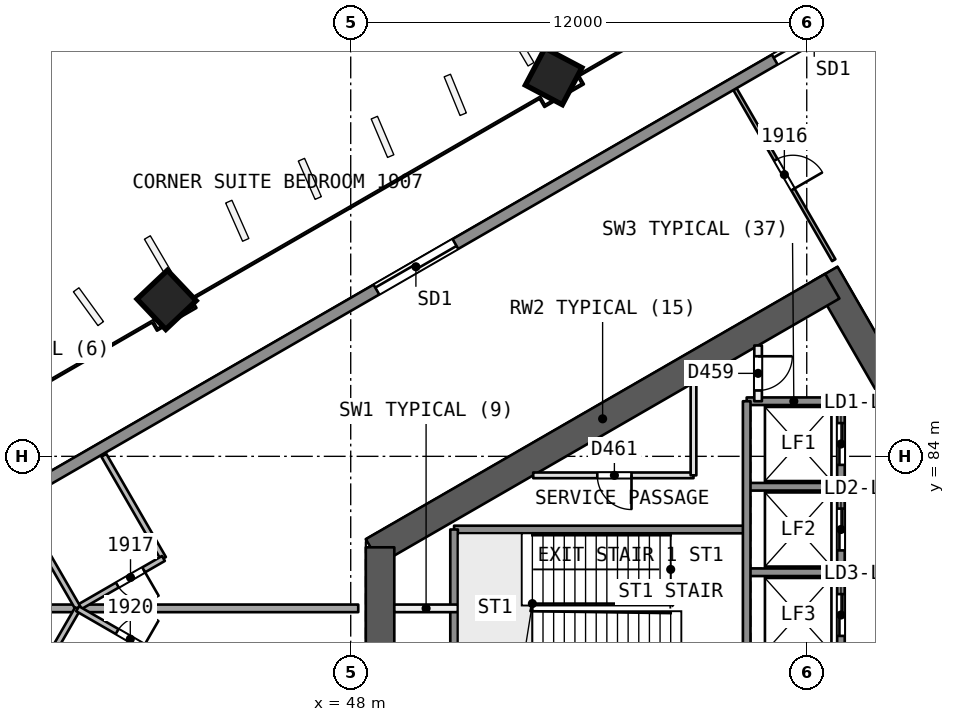
"""IFC4 building model, lengths in metres.
Left out: names, types, materials, properties, quantities, classifications, styles, units other than length and angle.
Written with IfcOpenShell. Run it as: python <this file> out.ifc"""

import sys

from ifc_helpers import new_model, si_unit, direction, frame, frame_2d, origin, origin_2d, place, context, subcontext, project, spatial, rectangle, extrude, element, fill, save


model = new_model("IFC4")
c1 = context("Model", 3, precision=1e-05, world=origin(), true_north=direction((0.0, 1.0)))
c2 = subcontext(c1, "Body", "Model", "MODEL_VIEW")
j1 = project(units=[si_unit("LENGTHUNIT", "METRE"), si_unit("PLANEANGLEUNIT", "RADIAN")], contexts=[c1])
p1 = place(None, origin())
s1 = spatial("IfcSite", under=j1, at=p1, CompositionType="ELEMENT")
p2 = place(p1, origin())
s2 = spatial("IfcBuilding", under=s1, at=p2, CompositionType="ELEMENT")
p3 = place(p2, frame((0.0, 0.0, 83.2)))
s3 = spatial("IfcBuildingStorey", under=s2, at=p3, CompositionType="ELEMENT", Elevation=83.2)
p4 = place(p3, frame((65.567, 80.0, 0.0), z_axis=(0.0, 0.0, 1.0), x_axis=(-0.499988615364, 0.866031976607, 0.0)))
e1 = element("IfcWall", 1, at=p4, inside=s3, PredefinedType="SHEAR", context=c2, shape_type="SweptSolid", body=[
    extrude(rectangle(XDim=10.163, YDim=0.75, at=frame_2d((5.082, 0.0))), origin(), (0.0, 0.0, 1.0), 3.7),
])
p5 = place(p4, frame((0.733, 0.0, 0.0)))
e2 = element("IfcOpeningElement", 2, at=p5, cuts=e1, PredefinedType="OPENING", context=c2, shape_type="SweptSolid", body=[
    extrude(rectangle(XDim=1.2, YDim=2.1, at=frame_2d((0.6, 1.05))), frame((0.0, 0.385, 0.0), z_axis=(0.0, -1.0, 0.0), x_axis=(1.0, 0.0, 0.0)), (0.0, 0.0, 1.0), 0.771),
])
p6 = place(p3, frame((60.673, 88.477, 0.0), z_axis=(0.0, 0.0, 1.0), x_axis=(-0.8660248072, -0.500001033313, 0.0)))
e3 = element("IfcWall", 3, at=p6, inside=s3, PredefinedType="SHEAR", context=c2, shape_type="SweptSolid", body=[
    extrude(rectangle(XDim=13.958, YDim=0.75, at=frame_2d((6.979, 0.0))), origin(), (0.0, 0.0, 1.0), 3.7),
])
p7 = place(p3, frame((48.772, 81.606, 0.0), z_axis=(0.0, 0.0, 1.0), x_axis=(0.0, -1.0, 0.0)))
e4 = element("IfcWall", 4, at=p7, inside=s3, PredefinedType="SHEAR", context=c2, shape_type="SweptSolid", body=[
    extrude(rectangle(XDim=3.429, YDim=0.75, at=frame_2d((1.714, 0.0))), origin(), (0.0, 0.0, 1.0), 3.7),
])
p8 = place(p3, frame((60.673, 71.523, 0.0), z_axis=(0.0, 0.0, 1.0), x_axis=(0.499997052475, 0.866027105532, 0.0)))
e5 = element("IfcWall", 5, at=p8, inside=s3, PredefinedType="SHEAR", context=c2, shape_type="SweptSolid", body=[
    extrude(rectangle(XDim=10.005, YDim=0.75, at=frame_2d((5.002, 0.0))), origin(), (0.0, 0.0, 1.0), 3.7),
])
p9 = place(p8, frame((7.855, 0.0, 0.0)))
e6 = element("IfcOpeningElement", 6, at=p9, cuts=e5, PredefinedType="OPENING", context=c2, shape_type="SweptSolid", body=[
    extrude(rectangle(XDim=1.2, YDim=2.1, at=frame_2d((0.6, 1.05))), frame((0.0, 0.385, 0.0), z_axis=(0.0, -1.0, 0.0), x_axis=(1.0, 0.0, 0.0)), (0.0, 0.0, 1.0), 0.771),
])
p10 = place(p3, frame((53.317, 94.011, 0.0), z_axis=(0.019328516974, -0.012138044789, 0.999739504221), x_axis=(-0.500200160538, 0.865674608258, 0.020180981521)))
e7 = element("IfcColumn", 7, at=p10, inside=s3, PredefinedType="COLUMN", context=c2, shape_type="SweptSolid", body=[
    extrude(rectangle(XDim=1.1, YDim=1.1, at=origin_2d()), origin(), (0.0, 0.0, 1.0), 3.701),
])
p11 = place(p3, frame((43.121, 88.125, 0.0), z_axis=(0.02855911485, -0.006793507689, 0.999569019734), x_axis=(-0.500405785832, 0.865555785013, 0.020180003373)))
e8 = element("IfcColumn", 8, at=p11, inside=s3, PredefinedType="COLUMN", context=c2, shape_type="SweptSolid", body=[
    extrude(rectangle(XDim=1.1, YDim=1.1, at=origin_2d()), origin(), (0.0, 0.0, 1.0), 3.702),
])
p12 = place(p3, frame((58.112, 93.663, 0.0), z_axis=(0.0, 0.0, 1.0), x_axis=(0.499973171224, -0.866040892832, 0.0)))
e9 = element("IfcWall", 9, at=p12, inside=s3, PredefinedType="PARTITIONING", context=c2, shape_type="SweptSolid", body=[
    extrude(rectangle(XDim=5.198, YDim=0.1, at=frame_2d((2.599, 0.0))), origin(), (0.0, 0.0, 1.0), 3.2),
])
p13 = place(p12, frame((2.149, 0.0, 0.0)))
e10 = element("IfcOpeningElement", 10, at=p13, cuts=e9, PredefinedType="OPENING", context=c2, shape_type="SweptSolid", body=[
    extrude(rectangle(XDim=0.9, YDim=2.1, at=frame_2d((0.45, 1.05))), frame((0.0, 0.061, 0.0), z_axis=(0.0, -1.0, 0.0), x_axis=(1.0, 0.0, 0.0)), (0.0, 0.0, 1.0), 0.121),
])
p14 = place(p3, frame((41.504, 84.028, 0.0), z_axis=(0.0, 0.0, 1.0), x_axis=(0.499967424082, -0.866044210682, 0.0)))
e11 = element("IfcWall", 11, at=p14, inside=s3, PredefinedType="PARTITIONING", context=c2, shape_type="SweptSolid", body=[
    extrude(rectangle(XDim=3.135, YDim=0.15, at=frame_2d((1.567, 0.0))), origin(), (0.0, 0.0, 1.0), 3.2),
])
p15 = place(p3, frame((43.072, 81.313, 0.0), z_axis=(0.0, 0.0, 1.0), x_axis=(-0.866021400173, -0.500006934395, 0.0)))
e12 = element("IfcWall", 12, at=p15, inside=s3, PredefinedType="PARTITIONING", context=c2, shape_type="SweptSolid", body=[
    extrude(rectangle(XDim=2.6, YDim=0.15, at=frame_2d((1.3, 0.0))), origin(), (0.0, 0.0, 1.0), 3.2),
])
p16 = place(p15, frame((0.6, 0.0, 0.0)))
e13 = element("IfcOpeningElement", 13, at=p16, cuts=e12, PredefinedType="OPENING", context=c2, shape_type="SweptSolid", body=[
    extrude(rectangle(XDim=0.8, YDim=2.1, at=frame_2d((0.4, 1.05))), frame((0.0, 0.085, 0.0), z_axis=(0.0, -1.0, 0.0), x_axis=(1.0, 0.0, 0.0)), (0.0, 0.0, 1.0), 0.171),
])
p17 = place(p3, frame((40.82, 80.013, 0.0), z_axis=(0.0, 0.0, 1.0), x_axis=(-0.499995114243, 0.866028224559, 0.0)))
e14 = element("IfcWall", 14, at=p17, inside=s3, PredefinedType="PARTITIONING", context=c2, shape_type="SweptSolid", body=[
    extrude(rectangle(XDim=2.635, YDim=0.15, at=frame_2d((1.318, 0.0))), origin(), (0.0, 0.0, 1.0), 3.2),
])
p18 = place(p3, frame((39.502, 80.0, 0.0), z_axis=(0.0, 0.0, 1.0), x_axis=(1.0, 0.0, 0.0)))
e15 = element("IfcWall", 15, at=p18, inside=s3, PredefinedType="PARTITIONING", context=c2, shape_type="SweptSolid", body=[
    extrude(rectangle(XDim=8.696, YDim=0.2, at=frame_2d((4.348, 0.0))), origin(), (0.0, 0.0, 1.0), 3.2),
])
p19 = place(p3, frame((39.502, 77.718, 0.0), z_axis=(0.0, 0.0, 1.0), x_axis=(0.499972156837, 0.866041478445, 0.0)))
e16 = element("IfcWall", 16, at=p19, inside=s3, PredefinedType="PARTITIONING", context=c2, shape_type="SweptSolid", body=[
    extrude(rectangle(XDim=2.624, YDim=0.15, at=frame_2d((1.312, 0.0))), origin(), (0.0, 0.0, 1.0), 3.2),
])
p20 = place(p3, frame((40.814, 79.99, 0.0), z_axis=(0.0, 0.0, 1.0), x_axis=(0.866062058628, -0.499936506574, 0.0)))
e17 = element("IfcWall", 17, at=p20, inside=s3, PredefinedType="PARTITIONING", context=c2, shape_type="SweptSolid", body=[
    extrude(rectangle(XDim=2.6, YDim=0.15, at=frame_2d((1.3, 0.0))), origin(), (0.0, 0.0, 1.0), 3.2),
])
p21 = place(p20, frame((1.2, 0.0, 0.0)))
e18 = element("IfcOpeningElement", 18, at=p21, cuts=e17, PredefinedType="OPENING", context=c2, shape_type="SweptSolid", body=[
    extrude(rectangle(XDim=0.8, YDim=2.1, at=frame_2d((0.4, 1.05))), frame((0.0, 0.085, 0.0), z_axis=(0.0, -1.0, 0.0), x_axis=(1.0, 0.0, 0.0)), (0.0, 0.0, 1.0), 0.171),
])
p22 = place(p3, frame((39.353, 83.005, 0.0), z_axis=(0.0, 0.0, 1.0), x_axis=(0.866025832118, 0.499999258104, 0.0)))
e19 = element("IfcWall", 19, at=p22, inside=s3, PredefinedType="SOLIDWALL", context=c2, shape_type="SweptSolid", body=[
    extrude(rectangle(XDim=58.737, YDim=0.3, at=frame_2d((29.368, 0.0))), origin(), (0.0, 0.0, 1.0), 3.2),
])
p23 = place(p22, frame((28.636, 0.0, 0.0)))
e20 = element("IfcOpeningElement", 20, at=p23, cuts=e19, PredefinedType="OPENING", context=c2, shape_type="SweptSolid", body=[
    extrude(rectangle(XDim=2.4, YDim=2.4, at=frame_2d((1.2, 1.2))), frame((0.0, 0.161, 0.0), z_axis=(0.0, -1.0, 0.0), x_axis=(1.0, 0.0, 0.0)), (0.0, 0.0, 1.0), 0.321),
])
p24 = place(p22, frame((33.936, 0.0, 0.0)))
e21 = element("IfcOpeningElement", 21, at=p24, cuts=e19, PredefinedType="OPENING", context=c2, shape_type="SweptSolid", body=[
    extrude(rectangle(XDim=2.4, YDim=2.4, at=frame_2d((1.2, 1.2))), frame((0.0, 0.161, 0.0), z_axis=(0.0, -1.0, 0.0), x_axis=(1.0, 0.0, 0.0)), (0.0, 0.0, 1.0), 0.321),
])
p25 = place(p22, frame((45.575, 0.0, 0.0)))
e22 = element("IfcOpeningElement", 22, at=p25, cuts=e19, PredefinedType="OPENING", context=c2, shape_type="SweptSolid", body=[
    extrude(rectangle(XDim=2.4, YDim=2.4, at=frame_2d((1.2, 1.2))), frame((0.0, 0.161, 0.0), z_axis=(0.0, -1.0, 0.0), x_axis=(1.0, 0.0, 0.0)), (0.0, 0.0, 1.0), 0.321),
])
p26 = place(p22, frame((22.868, 0.0, 0.0)))
e23 = element("IfcOpeningElement", 23, at=p26, cuts=e19, PredefinedType="OPENING", context=c2, shape_type="SweptSolid", body=[
    extrude(rectangle(XDim=2.4, YDim=2.4, at=frame_2d((1.2, 1.2))), frame((0.0, 0.161, 0.0), z_axis=(0.0, -1.0, 0.0), x_axis=(1.0, 0.0, 0.0)), (0.0, 0.0, 1.0), 0.321),
])
p27 = place(p22, frame((10.765, 0.0, 0.0)))
e24 = element("IfcOpeningElement", 24, at=p27, cuts=e19, PredefinedType="OPENING", context=c2, shape_type="SweptSolid", body=[
    extrude(rectangle(XDim=2.4, YDim=2.4, at=frame_2d((1.2, 1.2))), frame((0.0, 0.161, 0.0), z_axis=(0.0, -1.0, 0.0), x_axis=(1.0, 0.0, 0.0)), (0.0, 0.0, 1.0), 0.321),
])
p28 = place(p3, frame((60.9, 85.45, 0.0), z_axis=(0.0, 0.0, 1.0), x_axis=(-1.0, 0.0, 0.0)))
e25 = element("IfcWall", 25, at=p28, inside=s3, PredefinedType="SOLIDWALL", context=c2, shape_type="SweptSolid", body=[
    extrude(rectangle(XDim=2.48, YDim=0.2, at=frame_2d((1.24, 0.0))), origin(), (0.0, 0.0, 1.0), 3.2),
])
p29 = place(p3, frame((57.02, 83.5, 0.0), z_axis=(0.0, 0.0, 1.0), x_axis=(-1.0, 0.0, 0.0)))
e26 = element("IfcWall", 26, at=p29, inside=s3, PredefinedType="PARTITIONING", context=c2, shape_type="SweptSolid", body=[
    extrude(rectangle(XDim=4.218, YDim=0.15, at=frame_2d((2.109, 0.0))), origin(), (0.0, 0.0, 1.0), 3.2),
])
p30 = place(p29, frame((1.631, 0.0, 0.0)))
e27 = element("IfcOpeningElement", 27, at=p30, cuts=e26, PredefinedType="OPENING", context=c2, shape_type="SweptSolid", body=[
    extrude(rectangle(XDim=0.9, YDim=2.1, at=frame_2d((0.45, 1.05))), frame((0.0, 0.085, 0.0), z_axis=(0.0, -1.0, 0.0), x_axis=(1.0, 0.0, 0.0)), (0.0, 0.0, 1.0), 0.171),
])
p31 = place(p3, frame((60.9, 83.2, 0.0), z_axis=(0.0, 0.0, 1.0), x_axis=(-1.0, 0.0, 0.0)))
e28 = element("IfcWall", 28, at=p31, inside=s3, PredefinedType="SOLIDWALL", context=c2, shape_type="SweptSolid", body=[
    extrude(rectangle(XDim=2.48, YDim=0.2, at=frame_2d((1.24, 0.0))), origin(), (0.0, 0.0, 1.0), 3.2),
])
p32 = place(p3, frame((58.42, 82.075, 0.0), z_axis=(0.0, 0.0, 1.0), x_axis=(-1.0, 0.0, 0.0)))
e29 = element("IfcWall", 29, at=p32, inside=s3, PredefinedType="SOLIDWALL", context=c2, shape_type="SweptSolid", body=[
    extrude(rectangle(XDim=7.7, YDim=0.2, at=frame_2d((3.85, 0.0))), origin(), (0.0, 0.0, 1.0), 3.2),
])
p33 = place(p3, frame((60.9, 80.95, 0.0), z_axis=(0.0, 0.0, 1.0), x_axis=(-1.0, 0.0, 0.0)))
e30 = element("IfcWall", 30, at=p33, inside=s3, PredefinedType="SOLIDWALL", context=c2, shape_type="SweptSolid", body=[
    extrude(rectangle(XDim=2.48, YDim=0.2, at=frame_2d((1.24, 0.0))), origin(), (0.0, 0.0, 1.0), 3.2),
])
p34 = place(p3, frame((50.82, 80.0, 0.0), z_axis=(0.0, 0.0, 1.0), x_axis=(-1.0, 0.0, 0.0)))
e31 = element("IfcWall", 31, at=p34, inside=s3, PredefinedType="PARTITIONING", context=c2, shape_type="SweptSolid", body=[
    extrude(rectangle(XDim=1.673, YDim=0.2, at=frame_2d((0.836, 0.0))), origin(), (0.0, 0.0, 1.0), 3.2),
])
p35 = place(p3, frame((60.9, 85.45, 0.0), z_axis=(0.0, 0.0, 1.0), x_axis=(0.0, -1.0, 0.0)))
e32 = element("IfcWall", 32, at=p35, inside=s3, PredefinedType="SOLIDWALL", context=c2, shape_type="SweptSolid", body=[
    extrude(rectangle(XDim=10.9, YDim=0.2, at=frame_2d((5.45, 0.0))), origin(), (0.0, 0.0, 1.0), 3.2),
])
p36 = place(p35, frame((0.575, 0.0, 0.0)))
e33 = element("IfcOpeningElement", 33, at=p36, cuts=e32, PredefinedType="OPENING", context=c2, shape_type="SweptSolid", body=[
    extrude(rectangle(XDim=1.1, YDim=2.1, at=frame_2d((0.55, 1.05))), frame((0.0, 0.11, 0.0), z_axis=(0.0, -1.0, 0.0), x_axis=(1.0, 0.0, 0.0)), (0.0, 0.0, 1.0), 0.221),
])
p37 = place(p35, frame((2.825, 0.0, 0.0)))
e34 = element("IfcOpeningElement", 34, at=p37, cuts=e32, PredefinedType="OPENING", context=c2, shape_type="SweptSolid", body=[
    extrude(rectangle(XDim=1.1, YDim=2.1, at=frame_2d((0.55, 1.05))), frame((0.0, 0.11, 0.0), z_axis=(0.0, -1.0, 0.0), x_axis=(1.0, 0.0, 0.0)), (0.0, 0.0, 1.0), 0.221),
])
p38 = place(p35, frame((5.075, 0.0, 0.0)))
e35 = element("IfcOpeningElement", 35, at=p38, cuts=e32, PredefinedType="OPENING", context=c2, shape_type="SweptSolid", body=[
    extrude(rectangle(XDim=1.1, YDim=2.1, at=frame_2d((0.55, 1.05))), frame((0.0, 0.11, 0.0), z_axis=(0.0, -1.0, 0.0), x_axis=(1.0, 0.0, 0.0)), (0.0, 0.0, 1.0), 0.221),
])
p39 = place(p35, frame((7.325, 0.0, 0.0)))
e36 = element("IfcOpeningElement", 36, at=p39, cuts=e32, PredefinedType="OPENING", context=c2, shape_type="SweptSolid", body=[
    extrude(rectangle(XDim=1.1, YDim=2.1, at=frame_2d((0.55, 1.05))), frame((0.0, 0.11, 0.0), z_axis=(0.0, -1.0, 0.0), x_axis=(1.0, 0.0, 0.0)), (0.0, 0.0, 1.0), 0.221),
])
p40 = place(p3, frame((58.72, 86.917, 0.0), z_axis=(0.0, 0.0, 1.0), x_axis=(0.0, -1.0, 0.0)))
e37 = element("IfcWall", 37, at=p40, inside=s3, PredefinedType="PARTITIONING", context=c2, shape_type="SweptSolid", body=[
    extrude(rectangle(XDim=1.467, YDim=0.2, at=frame_2d((0.733, 0.0))), origin(), (0.0, 0.0, 1.0), 3.2),
])
p41 = place(p40, frame((0.283, 0.0, 0.0)))
e38 = element("IfcOpeningElement", 38, at=p41, cuts=e37, PredefinedType="OPENING", context=c2, shape_type="SweptSolid", body=[
    extrude(rectangle(XDim=0.9, YDim=2.1, at=frame_2d((0.45, 1.05))), frame((0.0, 0.11, 0.0), z_axis=(0.0, -1.0, 0.0), x_axis=(1.0, 0.0, 0.0)), (0.0, 0.0, 1.0), 0.221),
])
p42 = place(p3, frame((58.42, 85.45, 0.0), z_axis=(0.0, 0.0, 1.0), x_axis=(0.0, -1.0, 0.0)))
e39 = element("IfcWall", 39, at=p42, inside=s3, PredefinedType="SOLIDWALL", context=c2, shape_type="SweptSolid", body=[
    extrude(rectangle(XDim=9.0, YDim=0.2, at=frame_2d((4.5, 0.0))), origin(), (0.0, 0.0, 1.0), 3.2),
])
p43 = place(p3, frame((57.02, 85.935, 0.0), z_axis=(0.0, 0.0, 1.0), x_axis=(0.0, -1.0, 0.0)))
e40 = element("IfcWall", 40, at=p43, inside=s3, PredefinedType="PARTITIONING", context=c2, shape_type="SweptSolid", body=[
    extrude(rectangle(XDim=2.435, YDim=0.15, at=frame_2d((1.218, 0.0))), origin(), (0.0, 0.0, 1.0), 3.2),
])
p44 = place(p3, frame((50.72, 82.075, 0.0), z_axis=(0.0, 0.0, 1.0), x_axis=(0.0, -1.0, 0.0)))
e41 = element("IfcWall", 41, at=p44, inside=s3, PredefinedType="SOLIDWALL", context=c2, shape_type="SweptSolid", body=[
    extrude(rectangle(XDim=4.15, YDim=0.2, at=frame_2d((2.075, 0.0))), origin(), (0.0, 0.0, 1.0), 3.2),
])
p45 = place(p13, origin())
e42 = element("IfcDoor", 42, at=p45, inside=s3, OperationType="SINGLE_SWING_RIGHT", PredefinedType="NOTDEFINED", context=c2, shape_type="SweptSolid", body=[
    extrude(rectangle(XDim=0.9, YDim=2.1, at=frame_2d((0.45, 1.05))), frame((0.0, 0.025, 0.0), z_axis=(0.0, -1.0, 0.0), x_axis=(1.0, 0.0, 0.0)), (0.0, 0.0, 1.0), 0.05),
])
fill(e10, e42)
p46 = place(p16, origin())
e43 = element("IfcDoor", 43, at=p46, inside=s3, OperationType="SINGLE_SWING_LEFT", PredefinedType="NOTDEFINED", context=c2, shape_type="SweptSolid", body=[
    extrude(rectangle(XDim=0.8, YDim=2.1, at=frame_2d((0.4, 1.05))), frame((0.0, 0.025, 0.0), z_axis=(0.0, -1.0, 0.0), x_axis=(1.0, 0.0, 0.0)), (0.0, 0.0, 1.0), 0.05),
])
fill(e13, e43)
p47 = place(p21, origin())
e44 = element("IfcDoor", 44, at=p47, inside=s3, OperationType="SINGLE_SWING_RIGHT", PredefinedType="NOTDEFINED", context=c2, shape_type="SweptSolid", body=[
    extrude(rectangle(XDim=0.8, YDim=2.1, at=frame_2d((0.4, 1.05))), frame((0.0, 0.025, 0.0), z_axis=(0.0, -1.0, 0.0), x_axis=(1.0, 0.0, 0.0)), (0.0, 0.0, 1.0), 0.05),
])
fill(e18, e44)
p48 = place(p26, origin())
e45 = element("IfcDoor", 45, at=p48, inside=s3, OperationType="SLIDING_TO_RIGHT", PredefinedType="NOTDEFINED", context=c2, shape_type="SweptSolid", body=[
    extrude(rectangle(XDim=2.4, YDim=2.4, at=frame_2d((1.2, 1.2))), frame((0.0, 0.025, 0.0), z_axis=(0.0, -1.0, 0.0), x_axis=(1.0, 0.0, 0.0)), (0.0, 0.0, 1.0), 0.05),
])
fill(e23, e45)
p49 = place(p27, origin())
e46 = element("IfcDoor", 46, at=p49, inside=s3, OperationType="SLIDING_TO_LEFT", PredefinedType="NOTDEFINED", context=c2, shape_type="SweptSolid", body=[
    extrude(rectangle(XDim=2.4, YDim=2.4, at=frame_2d((1.2, 1.2))), frame((0.0, 0.025, 0.0), z_axis=(0.0, -1.0, 0.0), x_axis=(1.0, 0.0, 0.0)), (0.0, 0.0, 1.0), 0.05),
])
fill(e24, e46)
p50 = place(p36, origin())
e47 = element("IfcDoor", 47, at=p50, inside=s3, OperationType="SLIDING_TO_RIGHT", PredefinedType="NOTDEFINED", context=c2, shape_type="SweptSolid", body=[
    extrude(rectangle(XDim=1.1, YDim=2.1, at=frame_2d((0.55, 1.05))), frame((0.0, 0.025, 0.0), z_axis=(0.0, -1.0, 0.0), x_axis=(1.0, 0.0, 0.0)), (0.0, 0.0, 1.0), 0.05),
])
fill(e33, e47)
p51 = place(p37, origin())
e48 = element("IfcDoor", 48, at=p51, inside=s3, OperationType="SLIDING_TO_LEFT", PredefinedType="NOTDEFINED", context=c2, shape_type="SweptSolid", body=[
    extrude(rectangle(XDim=1.1, YDim=2.1, at=frame_2d((0.55, 1.05))), frame((0.0, 0.025, 0.0), z_axis=(0.0, -1.0, 0.0), x_axis=(1.0, 0.0, 0.0)), (0.0, 0.0, 1.0), 0.05),
])
fill(e34, e48)
p52 = place(p38, origin())
e49 = element("IfcDoor", 49, at=p52, inside=s3, OperationType="SLIDING_TO_RIGHT", PredefinedType="NOTDEFINED", context=c2, shape_type="SweptSolid", body=[
    extrude(rectangle(XDim=1.1, YDim=2.1, at=frame_2d((0.55, 1.05))), frame((0.0, 0.025, 0.0), z_axis=(0.0, -1.0, 0.0), x_axis=(1.0, 0.0, 0.0)), (0.0, 0.0, 1.0), 0.05),
])
fill(e35, e49)
p53 = place(p41, origin())
e50 = element("IfcDoor", 50, at=p53, inside=s3, OperationType="SINGLE_SWING_LEFT", PredefinedType="NOTDEFINED", context=c2, shape_type="SweptSolid", body=[
    extrude(rectangle(XDim=0.9, YDim=2.1, at=frame_2d((0.45, 1.05))), frame((0.0, 0.025, 0.0), z_axis=(0.0, -1.0, 0.0), x_axis=(1.0, 0.0, 0.0)), (0.0, 0.0, 1.0), 0.05),
])
fill(e38, e50)
p54 = place(p30, origin())
e51 = element("IfcDoor", 51, at=p54, inside=s3, OperationType="SINGLE_SWING_LEFT", PredefinedType="NOTDEFINED", context=c2, shape_type="SweptSolid", body=[
    extrude(rectangle(XDim=0.9, YDim=2.1, at=frame_2d((0.45, 1.05))), frame((0.0, 0.025, 0.0), z_axis=(0.0, -1.0, 0.0), x_axis=(1.0, 0.0, 0.0)), (0.0, 0.0, 1.0), 0.05),
])
fill(e27, e51)
save(model, sys.argv[1])
